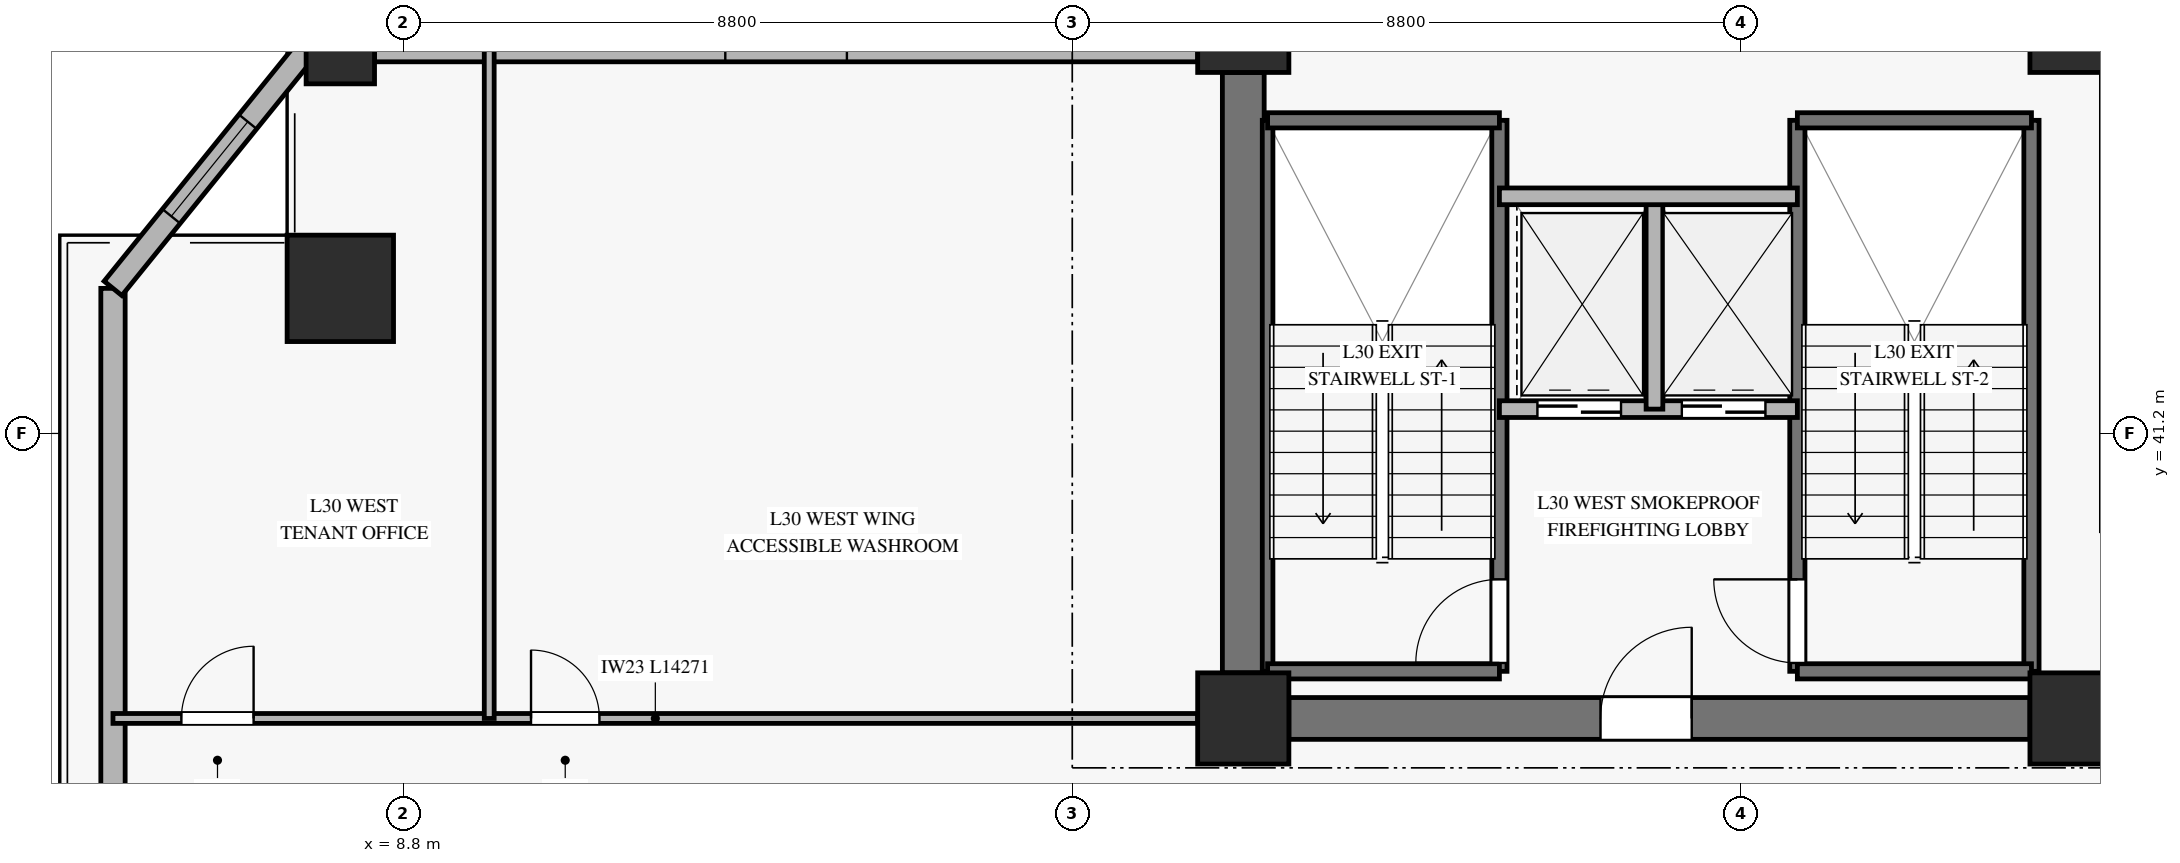
"""IFC4 building model, lengths in metres.
Left out: names, types, materials, properties, quantities, classifications, styles, units other than length and angle.
Written with IfcOpenShell. Run it as: python <this file> out.ifc"""

import sys

from ifc_helpers import new_model, si_unit, direction, frame, frame_2d, origin, origin_2d, place, context, subcontext, project, spatial, rectangle, hollow_rectangle, extrude, source, transform, mapped, element, fill, save


model = new_model("IFC4")
c1 = context("Model", 3, precision=1e-05, world=origin(), true_north=direction((0.0, 1.0)))
c2 = subcontext(c1, "Body", "Model", "MODEL_VIEW")
j1 = project(units=[si_unit("LENGTHUNIT", "METRE"), si_unit("PLANEANGLEUNIT", "RADIAN")], contexts=[c1])
p1 = place(None, origin())
s1 = spatial("IfcSite", under=j1, at=p1, CompositionType="ELEMENT")
p2 = place(p1, origin())
s2 = spatial("IfcBuilding", under=s1, at=p2, CompositionType="ELEMENT")
p3 = place(p2, frame((0.0, 0.0, 123.1)))
s3 = spatial("IfcBuildingStorey", under=s2, at=p3, CompositionType="ELEMENT", Elevation=123.1)
m1 = source(origin(), c2, "Body", "SweptSolid", [
    extrude(rectangle(XDim=1.2, YDim=1.2, at=origin_2d()), origin(), (0.0, 0.0, 1.0), 3.68),
])
for number, where, z_axis, x_axis in (
    (1, (19.85, 37.45, 0.0), (0.0, 0.0, 1.0), (1.0, 0.0, 0.0)),
    (2, (19.85, 46.55, 0.0), (0.0, 0.0, 1.0), (1.0, 0.0, 0.0)),
    (3, (30.8, 37.45, 0.0), (0.0, 0.0, 1.0), (1.0, 0.0, 0.0)),
    (4, (30.8, 46.55, 0.0), (0.0, 0.0, 1.0), (1.0, 0.0, 0.0)),
):
    element("IfcColumn", number, at=place(p3, frame(where, z_axis=z_axis, x_axis=x_axis)), inside=s3, PredefinedType="PILASTER", context=c2, shape_type="MappedRepresentation", body=[
        mapped(m1, transform((0.0, 0.0, 0.0), x_axis=(1.0, 0.0, 0.0), y_axis=(0.0, 1.0, 0.0), z_axis=(0.0, 0.0, 1.0), scale=1.0)),
    ])
p4 = place(p3, frame((20.45, 37.45, 0.0), z_axis=(0.0, 0.0, 1.0), x_axis=(1.0, 0.0, 0.0)))
e5 = element("IfcWall", 5, at=p4, inside=s3, PredefinedType="SHEAR", context=c2, shape_type="SweptSolid", body=[
    extrude(rectangle(XDim=9.75, YDim=0.55, at=frame_2d((4.875, 0.0))), origin(), (0.0, 0.0, 1.0), 3.68),
])
p5 = place(p4, frame((4.1, 0.0, 0.0)))
e6 = element("IfcOpeningElement", 6, at=p5, cuts=e5, PredefinedType="OPENING", context=c2, shape_type="SweptSolid", body=[
    extrude(rectangle(XDim=1.2, YDim=2.15, at=frame_2d((0.6, 1.075))), frame((0.0, 0.285, 0.0), z_axis=(0.0, -1.0, 0.0), x_axis=(1.0, 0.0, 0.0)), (0.0, 0.0, 1.0), 0.57),
])
p6 = place(p3, frame((19.85, 38.05, 0.0), z_axis=(0.0, 0.0, 1.0), x_axis=(0.0, 1.0, 0.0)))
e7 = element("IfcWall", 7, at=p6, inside=s3, PredefinedType="SHEAR", context=c2, shape_type="SweptSolid", body=[
    extrude(rectangle(XDim=7.9, YDim=0.55, at=frame_2d((3.95, 0.0))), origin(), (0.0, 0.0, 1.0), 3.68),
])
m2 = source(origin(), c2, "Body", "SweptSolid", [
    extrude(hollow_rectangle(XDim=1.4, YDim=1.4, WallThickness=0.065, at=origin_2d()), origin(), (0.0, 0.0, 1.0), 3.68),
])
p7 = place(p3, frame((7.97, 43.109, 0.0), z_axis=(0.0, 0.0, 1.0), x_axis=(1.0, 0.0, 0.0)))
e8 = element("IfcColumn", 8, at=p7, inside=s3, PredefinedType="COLUMN", context=c2, shape_type="MappedRepresentation", body=[
    mapped(m2, transform((0.0, 0.0, 0.0), x_axis=(1.0, 0.0, 0.0), y_axis=(0.0, 1.0, 0.0), z_axis=(0.0, 0.0, 1.0), scale=1.0)),
])
m3 = source(origin(), c2, "Body", "SweptSolid", [
    extrude(hollow_rectangle(XDim=0.9, YDim=0.9, WallThickness=0.04, at=origin_2d()), origin(), (0.0, 0.0, 1.0), 3.68),
])
p8 = place(p3, frame((7.97, 46.25, 0.0), z_axis=(0.0, 0.0, 1.0), x_axis=(1.0, 0.0, 0.0)))
e9 = element("IfcColumn", 9, at=p8, inside=s3, PredefinedType="COLUMN", context=c2, shape_type="MappedRepresentation", body=[
    mapped(m3, transform((0.0, 0.0, 0.0), x_axis=(1.0, 0.0, 0.0), y_axis=(0.0, 1.0, 0.0), z_axis=(0.0, 0.0, 1.0), scale=1.0)),
])
p9 = place(p3, frame((4.979, 27.259, 0.0), z_axis=(0.0, 0.0, 1.0), x_axis=(0.0, 1.0, 0.0)))
e10 = element("IfcWall", 10, at=p9, inside=s3, PredefinedType="SOLIDWALL", context=c2, shape_type="SweptSolid", body=[
    extrude(rectangle(XDim=15.85, YDim=0.32, at=frame_2d((7.925, 0.0))), origin(), (0.0, 0.0, 1.0), 3.16),
])
p10 = place(p9, frame((3.076, 0.0, 0.45)))
e11 = element("IfcOpeningElement", 11, at=p10, cuts=e10, PredefinedType="OPENING", context=c2, shape_type="SweptSolid", body=[
    extrude(rectangle(XDim=2.4, YDim=2.1, at=frame_2d((1.2, 1.05))), frame((0.0, 0.17, 0.0), z_axis=(0.0, -1.0, 0.0), x_axis=(1.0, 0.0, 0.0)), (0.0, 0.0, 1.0), 0.34),
])
p11 = place(p3, frame((8.42, 46.25, 0.0), z_axis=(0.0, 0.0, 1.0), x_axis=(1.0, 0.0, 0.0)))
e12 = element("IfcWall", 12, at=p11, inside=s3, PredefinedType="SOLIDWALL", context=c2, shape_type="SweptSolid", body=[
    extrude(rectangle(XDim=10.83, YDim=0.32, at=frame_2d((5.415, 0.0))), origin(), (0.0, 0.0, 1.0), 3.16),
])
p12 = place(p11, frame((4.615, 0.0, 0.45)))
e13 = element("IfcOpeningElement", 13, at=p12, cuts=e12, PredefinedType="OPENING", context=c2, shape_type="SweptSolid", body=[
    extrude(rectangle(XDim=1.6, YDim=2.0, at=frame_2d((0.8, 1.0))), frame((0.0, 0.17, 0.0), z_axis=(0.0, -1.0, 0.0), x_axis=(1.0, 0.0, 0.0)), (0.0, 0.0, 1.0), 0.34),
])
p13 = place(p3, frame((7.52, 46.25, 0.0), z_axis=(0.0, 0.0, 1.0), x_axis=(-0.62893048879, -0.7774615362, 0.0)))
e14 = element("IfcWall", 14, at=p13, inside=s3, PredefinedType="SOLIDWALL", context=c2, shape_type="SweptSolid", body=[
    extrude(rectangle(XDim=4.04, YDim=0.3, at=frame_2d((2.02, 0.0))), origin(), (0.0, 0.0, 1.0), 3.16),
])
p14 = place(p13, frame((1.22, 0.0, 0.45)))
e15 = element("IfcOpeningElement", 15, at=p14, cuts=e14, PredefinedType="OPENING", context=c2, shape_type="SweptSolid", body=[
    extrude(rectangle(XDim=1.6, YDim=2.0, at=frame_2d((0.8, 1.0))), frame((0.0, 0.16, 0.0), z_axis=(0.0, -1.0, 0.0), x_axis=(1.0, 0.0, 0.0)), (0.0, 0.0, 1.0), 0.32),
])
p15 = place(p3, frame((20.17, 38.07, 0.0), z_axis=(0.0, 0.0, 1.0), x_axis=(0.0, 1.0, 0.0)))
e16 = element("IfcWall", 16, at=p15, inside=s3, PredefinedType="SOLIDWALL", context=c2, shape_type="SweptSolid", body=[
    extrude(rectangle(XDim=7.25, YDim=0.14, at=frame_2d((3.625, 0.0))), origin(), (0.0, 0.0, 1.0), 3.9),
])
p16 = place(p3, frame((23.22, 38.07, 0.0), z_axis=(0.0, 0.0, 1.0), x_axis=(0.0, 1.0, 0.0)))
e17 = element("IfcWall", 17, at=p16, inside=s3, PredefinedType="SOLIDWALL", context=c2, shape_type="SweptSolid", body=[
    extrude(rectangle(XDim=7.25, YDim=0.2, at=frame_2d((3.625, 0.0))), origin(), (0.0, 0.0, 1.0), 3.9),
])
p17 = place(p16, frame((0.11, 0.0, 0.0)))
e18 = element("IfcOpeningElement", 18, at=p17, cuts=e17, PredefinedType="OPENING", context=c2, shape_type="SweptSolid", body=[
    extrude(rectangle(XDim=1.1, YDim=2.15, at=frame_2d((0.55, 1.075))), frame((0.0, 0.11, 0.0), z_axis=(0.0, -1.0, 0.0), x_axis=(1.0, 0.0, 0.0)), (0.0, 0.0, 1.0), 0.22),
])
for number, where, z_axis, x_axis in (
    (19, (20.17, 45.32, 0.0), (0.0, 0.0, 1.0), (1.0, 0.0, 0.0)),
    (20, (20.17, 38.07, 0.0), (0.0, 0.0, 1.0), (1.0, 0.0, 0.0)),
):
    element("IfcWall", number, at=place(p3, frame(where, z_axis=z_axis, x_axis=x_axis)), inside=s3, PredefinedType="SOLIDWALL", context=c2, shape_type="SweptSolid", body=[
        extrude(rectangle(XDim=3.05, YDim=0.2, at=frame_2d((1.525, 0.0))), origin(), (0.0, 0.0, 1.0), 3.9),
    ])
p18 = place(p3, frame((27.14, 38.07, 0.0), z_axis=(0.0, 0.0, 1.0), x_axis=(0.0, 1.0, 0.0)))
e21 = element("IfcWall", 21, at=p18, inside=s3, PredefinedType="SOLIDWALL", context=c2, shape_type="SweptSolid", body=[
    extrude(rectangle(XDim=7.25, YDim=0.2, at=frame_2d((3.625, 0.0))), origin(), (0.0, 0.0, 1.0), 3.9),
])
p19 = place(p18, frame((0.11, 0.0, 0.0)))
e22 = element("IfcOpeningElement", 22, at=p19, cuts=e21, PredefinedType="OPENING", context=c2, shape_type="SweptSolid", body=[
    extrude(rectangle(XDim=1.1, YDim=2.15, at=frame_2d((0.55, 1.075))), frame((0.0, 0.11, 0.0), z_axis=(0.0, -1.0, 0.0), x_axis=(1.0, 0.0, 0.0)), (0.0, 0.0, 1.0), 0.22),
])
p20 = place(p3, frame((30.22, 38.07, 0.0), z_axis=(0.0, 0.0, 1.0), x_axis=(0.0, 1.0, 0.0)))
e23 = element("IfcWall", 23, at=p20, inside=s3, PredefinedType="SOLIDWALL", context=c2, shape_type="SweptSolid", body=[
    extrude(rectangle(XDim=7.25, YDim=0.2, at=frame_2d((3.625, 0.0))), origin(), (0.0, 0.0, 1.0), 3.9),
])
for number, where, z_axis, x_axis in (
    (24, (27.14, 45.32, 0.0), (0.0, 0.0, 1.0), (1.0, 0.0, 0.0)),
    (25, (27.14, 38.07, 0.0), (0.0, 0.0, 1.0), (1.0, 0.0, 0.0)),
):
    element("IfcWall", number, at=place(p3, frame(where, z_axis=z_axis, x_axis=x_axis)), inside=s3, PredefinedType="SOLIDWALL", context=c2, shape_type="SweptSolid", body=[
        extrude(rectangle(XDim=3.08, YDim=0.2, at=frame_2d((1.54, 0.0))), origin(), (0.0, 0.0, 1.0), 3.9),
    ])
p21 = place(p3, frame((23.22, 41.52, 0.0), z_axis=(0.0, 0.0, 1.0), x_axis=(1.0, 0.0, 0.0)))
e26 = element("IfcWall", 26, at=p21, inside=s3, PredefinedType="SOLIDWALL", context=c2, shape_type="SweptSolid", body=[
    extrude(rectangle(XDim=3.92, YDim=0.22, at=frame_2d((1.96, 0.0))), origin(), (0.0, 0.0, 1.0), 3.68),
])
p22 = place(p21, frame((0.5, 0.0, 0.0)))
e27 = element("IfcOpeningElement", 27, at=p22, cuts=e26, PredefinedType="OPENING", context=c2, shape_type="SweptSolid", body=[
    extrude(rectangle(XDim=1.1, YDim=2.2, at=frame_2d((0.55, 1.1))), frame((0.0, 0.12, 0.0), z_axis=(0.0, -1.0, 0.0), x_axis=(1.0, 0.0, 0.0)), (0.0, 0.0, 1.0), 0.24),
])
p23 = place(p21, frame((2.4, 0.0, 0.0)))
e28 = element("IfcOpeningElement", 28, at=p23, cuts=e26, PredefinedType="OPENING", context=c2, shape_type="SweptSolid", body=[
    extrude(rectangle(XDim=1.1, YDim=2.2, at=frame_2d((0.55, 1.1))), frame((0.0, 0.12, 0.0), z_axis=(0.0, -1.0, 0.0), x_axis=(1.0, 0.0, 0.0)), (0.0, 0.0, 1.0), 0.24),
])
p24 = place(p3, frame((25.26, 41.52, 0.0), z_axis=(0.0, 0.0, 1.0), x_axis=(0.0, 1.0, 0.0)))
e29 = element("IfcWall", 29, at=p24, inside=s3, PredefinedType="SOLIDWALL", context=c2, shape_type="SweptSolid", body=[
    extrude(rectangle(XDim=2.8, YDim=0.22, at=frame_2d((1.4, 0.0))), origin(), (0.0, 0.0, 1.0), 3.68),
])
p25 = place(p3, frame((23.22, 44.32, 0.0), z_axis=(0.0, 0.0, 1.0), x_axis=(1.0, 0.0, 0.0)))
e30 = element("IfcWall", 30, at=p25, inside=s3, PredefinedType="SOLIDWALL", context=c2, shape_type="SweptSolid", body=[
    extrude(rectangle(XDim=3.92, YDim=0.22, at=frame_2d((1.96, 0.0))), origin(), (0.0, 0.0, 1.0), 3.68),
])
p26 = place(p3, frame((4.979, 37.45, 0.0), z_axis=(0.0, 0.0, 1.0), x_axis=(1.0, 0.0, 0.0)))
e31 = element("IfcWall", 31, at=p26, inside=s3, PredefinedType="PARTITIONING", context=c2, shape_type="SweptSolid", body=[
    extrude(rectangle(XDim=14.271, YDim=0.13, at=frame_2d((7.135, 0.0))), origin(), (0.0, 0.0, 1.0), 3.165),
])
p27 = place(p26, frame((0.9, 0.0, 0.0)))
e32 = element("IfcOpeningElement", 32, at=p27, cuts=e31, PredefinedType="OPENING", context=c2, shape_type="SweptSolid", body=[
    extrude(rectangle(XDim=0.95, YDim=2.1, at=frame_2d((0.475, 1.05))), frame((0.0, 0.075, 0.0), z_axis=(0.0, -1.0, 0.0), x_axis=(1.0, 0.0, 0.0)), (0.0, 0.0, 1.0), 0.15),
])
p28 = place(p26, frame((5.5, 0.0, 0.0)))
e33 = element("IfcOpeningElement", 33, at=p28, cuts=e31, PredefinedType="OPENING", context=c2, shape_type="SweptSolid", body=[
    extrude(rectangle(XDim=0.9, YDim=2.1, at=frame_2d((0.45, 1.05))), frame((0.0, 0.075, 0.0), z_axis=(0.0, -1.0, 0.0), x_axis=(1.0, 0.0, 0.0)), (0.0, 0.0, 1.0), 0.15),
])
p29 = place(p3, frame((9.929, 37.45, 0.0), z_axis=(0.0, 0.0, 1.0), x_axis=(0.0, 1.0, 0.0)))
e34 = element("IfcWall", 34, at=p29, inside=s3, PredefinedType="PARTITIONING", context=c2, shape_type="SweptSolid", body=[
    extrude(rectangle(XDim=8.8, YDim=0.13, at=frame_2d((4.4, 0.0))), origin(), (0.0, 0.0, 1.0), 3.68),
])
m4 = source(origin(), c2, "Body", "SweptSolid", [
    extrude(rectangle(XDim=1.6, YDim=2.0, at=frame_2d((0.8, 1.0))), frame((0.0, 0.03, 0.0), z_axis=(0.0, -1.0, 0.0), x_axis=(1.0, 0.0, 0.0)), (0.0, 0.0, 1.0), 0.06),
])
p30 = place(p14, origin())
e35 = element("IfcWindow", 35, at=p30, inside=s3, PartitioningType="SINGLE_PANEL", PredefinedType="WINDOW", context=c2, shape_type="MappedRepresentation", body=[
    mapped(m4, transform((0.0, 0.0, 0.0), x_axis=(1.0, 0.0, 0.0), y_axis=(0.0, 1.0, 0.0), z_axis=(0.0, 0.0, 1.0), scale=1.0)),
])
fill(e15, e35)
m5 = source(origin(), c2, "Body", "SweptSolid", [
    extrude(rectangle(XDim=1.1, YDim=2.15, at=frame_2d((0.55, 1.075))), frame((0.0, 0.025, 0.0), z_axis=(0.0, -1.0, 0.0), x_axis=(1.0, 0.0, 0.0)), (0.0, 0.0, 1.0), 0.05),
])
p31 = place(p17, origin())
e36 = element("IfcDoor", 36, at=p31, inside=s3, OperationType="SINGLE_SWING_LEFT", PredefinedType="DOOR", context=c2, shape_type="MappedRepresentation", body=[
    mapped(m5, transform((0.0, 0.0, 0.0), x_axis=(1.0, 0.0, 0.0), y_axis=(0.0, 1.0, 0.0), z_axis=(0.0, 0.0, 1.0), scale=1.0)),
])
fill(e18, e36)
p32 = place(p19, origin())
e37 = element("IfcDoor", 37, at=p32, inside=s3, OperationType="SINGLE_SWING_RIGHT", PredefinedType="DOOR", context=c2, shape_type="MappedRepresentation", body=[
    mapped(m5, transform((0.0, 0.0, 0.0), x_axis=(1.0, 0.0, 0.0), y_axis=(0.0, 1.0, 0.0), z_axis=(0.0, 0.0, 1.0), scale=1.0)),
])
fill(e22, e37)
m6 = source(origin(), c2, "Body", "SweptSolid", [
    extrude(rectangle(XDim=1.1, YDim=2.2, at=frame_2d((0.55, 1.1))), frame((0.0, 0.025, 0.0), z_axis=(0.0, -1.0, 0.0), x_axis=(1.0, 0.0, 0.0)), (0.0, 0.0, 1.0), 0.05),
])
p33 = place(p22, origin())
e38 = element("IfcDoor", 38, at=p33, inside=s3, OperationType="SLIDING_TO_LEFT", PredefinedType="DOOR", context=c2, shape_type="MappedRepresentation", body=[
    mapped(m6, transform((0.0, 0.0, 0.0), x_axis=(1.0, 0.0, 0.0), y_axis=(0.0, 1.0, 0.0), z_axis=(0.0, 0.0, 1.0), scale=1.0)),
])
fill(e27, e38)
p34 = place(p23, origin())
e39 = element("IfcDoor", 39, at=p34, inside=s3, OperationType="SLIDING_TO_LEFT", PredefinedType="DOOR", context=c2, shape_type="MappedRepresentation", body=[
    mapped(m6, transform((0.0, 0.0, 0.0), x_axis=(1.0, 0.0, 0.0), y_axis=(0.0, 1.0, 0.0), z_axis=(0.0, 0.0, 1.0), scale=1.0)),
])
fill(e28, e39)
m7 = source(origin(), c2, "Body", "SweptSolid", [
    extrude(rectangle(XDim=1.2, YDim=2.15, at=frame_2d((0.6, 1.075))), frame((0.0, 0.025, 0.0), z_axis=(0.0, -1.0, 0.0), x_axis=(1.0, 0.0, 0.0)), (0.0, 0.0, 1.0), 0.05),
])
p35 = place(p5, origin())
e40 = element("IfcDoor", 40, at=p35, inside=s3, OperationType="SINGLE_SWING_RIGHT", PredefinedType="DOOR", context=c2, shape_type="MappedRepresentation", body=[
    mapped(m7, transform((0.0, 0.0, 0.0), x_axis=(1.0, 0.0, 0.0), y_axis=(0.0, 1.0, 0.0), z_axis=(0.0, 0.0, 1.0), scale=1.0)),
])
fill(e6, e40)
m8 = source(origin(), c2, "Body", "SweptSolid", [
    extrude(rectangle(XDim=0.95, YDim=2.1, at=frame_2d((0.475, 1.05))), frame((0.0, 0.025, 0.0), z_axis=(0.0, -1.0, 0.0), x_axis=(1.0, 0.0, 0.0)), (0.0, 0.0, 1.0), 0.05),
])
p36 = place(p27, origin())
e41 = element("IfcDoor", 41, at=p36, inside=s3, OperationType="SINGLE_SWING_RIGHT", PredefinedType="DOOR", context=c2, shape_type="MappedRepresentation", body=[
    mapped(m8, transform((0.0, 0.0, 0.0), x_axis=(1.0, 0.0, 0.0), y_axis=(0.0, 1.0, 0.0), z_axis=(0.0, 0.0, 1.0), scale=1.0)),
])
fill(e32, e41)
m9 = source(origin(), c2, "Body", "SweptSolid", [
    extrude(rectangle(XDim=0.9, YDim=2.1, at=frame_2d((0.45, 1.05))), frame((0.0, 0.025, 0.0), z_axis=(0.0, -1.0, 0.0), x_axis=(1.0, 0.0, 0.0)), (0.0, 0.0, 1.0), 0.05),
])
p37 = place(p28, origin())
e42 = element("IfcDoor", 42, at=p37, inside=s3, OperationType="SINGLE_SWING_LEFT", PredefinedType="DOOR", context=c2, shape_type="MappedRepresentation", body=[
    mapped(m9, transform((0.0, 0.0, 0.0), x_axis=(1.0, 0.0, 0.0), y_axis=(0.0, 1.0, 0.0), z_axis=(0.0, 0.0, 1.0), scale=1.0)),
])
fill(e33, e42)
save(model, sys.argv[1])
